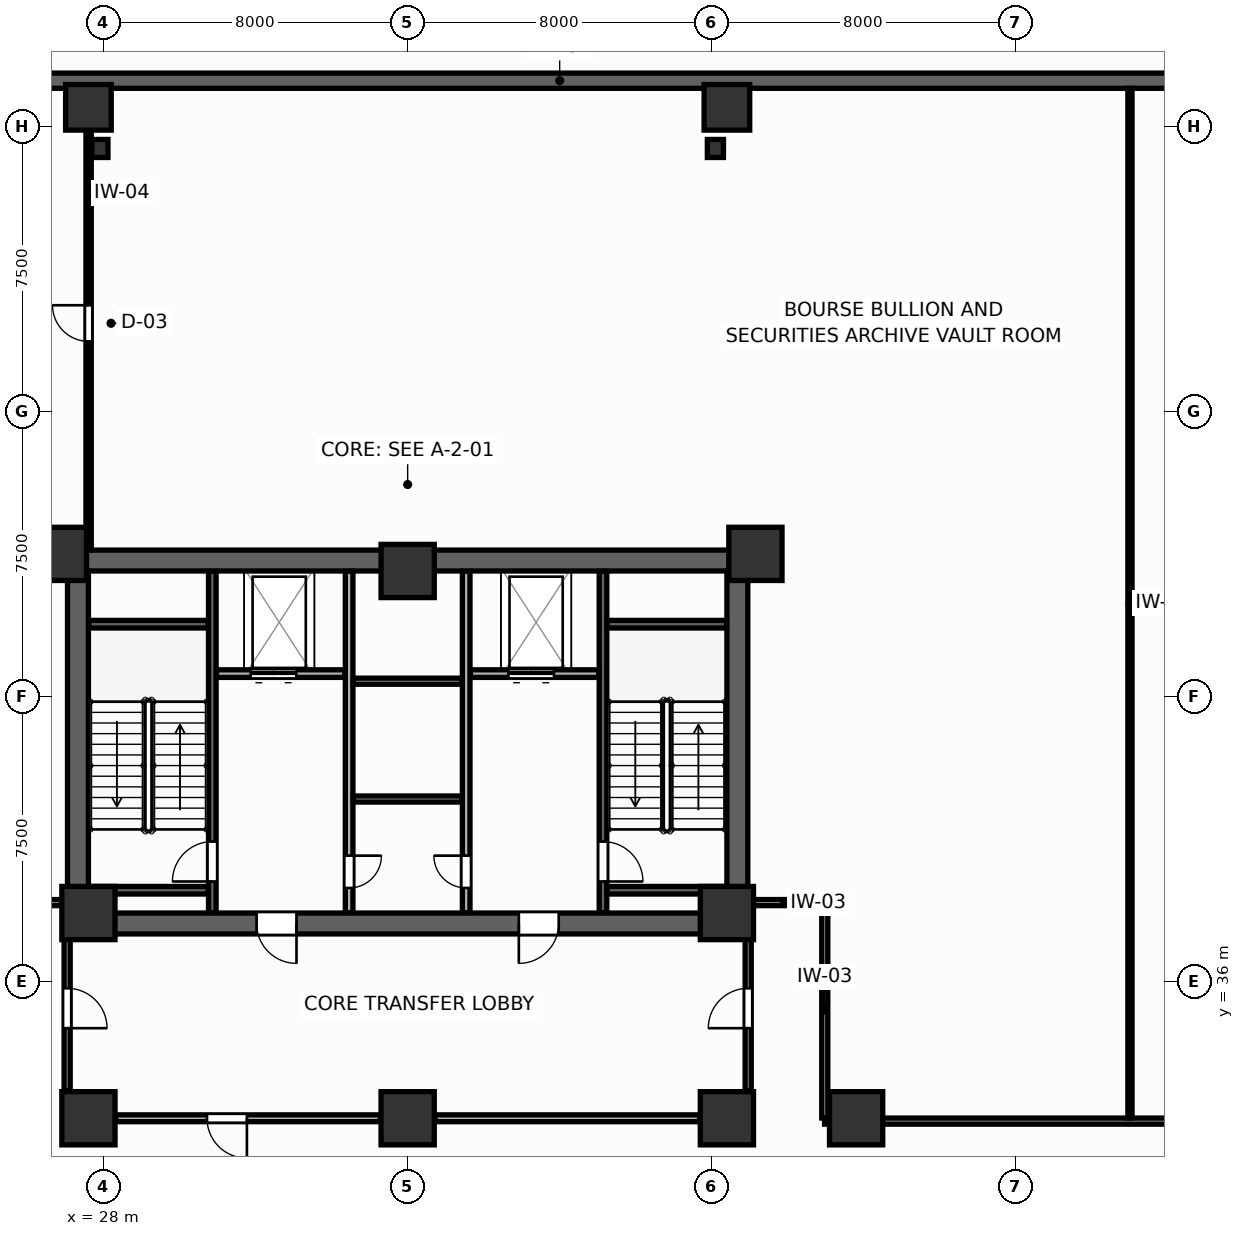
"""IFC4 building model, lengths in metres.
Left out: names, types, materials, properties, quantities, classifications, styles, units other than length and angle.
Written with IfcOpenShell. Run it as: python <this file> out.ifc"""

import sys

from ifc_helpers import new_model, si_unit, direction, frame, frame_2d, origin, origin_2d, place, context, subcontext, project, spatial, rectangle, i_section, extrude, source, transform, mapped, element, fill, save


model = new_model("IFC4")
c1 = context("Model", 3, precision=1e-05, world=origin(), true_north=direction((0.0, 1.0)))
c2 = subcontext(c1, "Body", "Model", "MODEL_VIEW")
j1 = project(units=[si_unit("LENGTHUNIT", "METRE"), si_unit("PLANEANGLEUNIT", "RADIAN")], contexts=[c1])
p1 = place(None, origin())
s1 = spatial("IfcSite", under=j1, at=p1, CompositionType="ELEMENT")
p2 = place(p1, origin())
s2 = spatial("IfcBuilding", under=s1, at=p2, CompositionType="ELEMENT")
p3 = place(p2, frame((0.0, 0.0, -9.0)))
s3 = spatial("IfcBuildingStorey", under=s2, at=p3, CompositionType="ELEMENT", Elevation=-9.0)
p4 = place(p3, frame((27.05, 47.075, 0.0), z_axis=(0.0, 0.0, 1.0), x_axis=(1.0, 0.0, 0.0)))
e1 = element("IfcWall", 1, at=p4, inside=s3, PredefinedType="SHEAR", context=c2, shape_type="SweptSolid", body=[
    extrude(rectangle(XDim=17.9, YDim=0.55, at=frame_2d((8.95, 0.0))), origin(), (0.0, 0.0, 1.0), 4.5),
])
p5 = place(p3, frame((27.05, 37.525, 0.0), z_axis=(0.0, 0.0, 1.0), x_axis=(1.0, 0.0, 0.0)))
e2 = element("IfcWall", 2, at=p5, inside=s3, PredefinedType="SHEAR", context=c2, shape_type="SweptSolid", body=[
    extrude(rectangle(XDim=17.9, YDim=0.55, at=frame_2d((8.95, 0.0))), origin(), (0.0, 0.0, 1.0), 4.5),
])
p6 = place(p5, frame((4.975, 0.0, 0.0)))
e3 = element("IfcOpeningElement", 3, at=p6, cuts=e2, PredefinedType="OPENING", context=c2, shape_type="SweptSolid", body=[
    extrude(rectangle(XDim=1.05, YDim=2.1, at=frame_2d((0.525, 1.05))), frame((0.0, 0.285, 0.0), z_axis=(0.0, -1.0, 0.0), x_axis=(1.0, 0.0, 0.0)), (0.0, 0.0, 1.0), 0.57),
])
p7 = place(p5, frame((11.875, 0.0, 0.0)))
e4 = element("IfcOpeningElement", 4, at=p7, cuts=e2, PredefinedType="OPENING", context=c2, shape_type="SweptSolid", body=[
    extrude(rectangle(XDim=1.05, YDim=2.1, at=frame_2d((0.525, 1.05))), frame((0.0, 0.285, 0.0), z_axis=(0.0, -1.0, 0.0), x_axis=(1.0, 0.0, 0.0)), (0.0, 0.0, 1.0), 0.57),
])
for number, where, z_axis, x_axis in (
    (5, (27.325, 37.8, 0.0), (0.0, 0.0, 1.0), (0.0, 1.0, 0.0)),
    (6, (44.675, 37.8, 0.0), (0.0, 0.0, 1.0), (0.0, 1.0, 0.0)),
):
    element("IfcWall", number, at=place(p3, frame(where, z_axis=z_axis, x_axis=x_axis)), inside=s3, PredefinedType="SHEAR", context=c2, shape_type="SweptSolid", body=[
        extrude(rectangle(XDim=9.0, YDim=0.55, at=frame_2d((4.5, 0.0))), origin(), (0.0, 0.0, 1.0), 4.5),
    ])
p8 = place(p3, frame((22.2, 59.7, 0.0), z_axis=(0.0, 0.0, 1.0), x_axis=(1.0, 0.0, 0.0)))
e7 = element("IfcWall", 7, at=p8, inside=s3, PredefinedType="SOLIDWALL", context=c2, shape_type="SweptSolid", body=[
    extrude(rectangle(XDim=35.6, YDim=0.4, at=frame_2d((17.8, 0.0))), origin(), (0.0, 0.0, 1.0), 4.18),
])
m1 = source(origin(), c2, "Body", "SweptSolid", [
    extrude(rectangle(XDim=1.4, YDim=1.4, at=origin_2d()), origin(), (0.0, 0.0, 1.0), 4.5),
])
for number, where, z_axis, x_axis in (
    (8, (26.85, 47.25, 0.0), (0.0, 0.0, 1.0), (1.0, 0.0, 0.0)),
    (9, (45.15, 47.25, 0.0), (0.0, 0.0, 1.0), (1.0, 0.0, 0.0)),
    (10, (27.6, 37.8, 0.0), (0.0, 0.0, 1.0), (1.0, 0.0, 0.0)),
    (11, (44.4, 37.8, 0.0), (0.0, 0.0, 1.0), (1.0, 0.0, 0.0)),
    (12, (27.6, 32.4, 0.0), (0.0, 0.0, 1.0), (1.0, 0.0, 0.0)),
    (13, (44.4, 32.4, 0.0), (0.0, 0.0, 1.0), (1.0, 0.0, 0.0)),
    (14, (36.0, 46.8, 0.0), (0.0, 0.0, 1.0), (1.0, 0.0, 0.0)),
    (15, (36.0, 32.4, 0.0), (0.0, 0.0, 1.0), (1.0, 0.0, 0.0)),
    (16, (47.8, 32.4, 0.0), (0.0, 0.0, 1.0), (1.0, 0.0, 0.0)),
):
    element("IfcColumn", number, at=place(p3, frame(where, z_axis=z_axis, x_axis=x_axis)), inside=s3, PredefinedType="COLUMN", context=c2, shape_type="MappedRepresentation", body=[
        mapped(m1, transform((0.0, 0.0, 0.0), scale=1.0)),
    ])
m2 = source(origin(), c2, "Body", "SweptSolid", [
    extrude(rectangle(XDim=1.2, YDim=1.2, at=origin_2d()), origin(), (0.0, 0.0, 1.0), 4.5),
])
for number, where, z_axis, x_axis in (
    (17, (27.6, 59.0, 0.0), (0.0, 0.0, 1.0), (1.0, 0.0, 0.0)),
    (18, (44.4, 59.0, 0.0), (0.0, 0.0, 1.0), (1.0, 0.0, 0.0)),
):
    element("IfcColumn", number, at=place(p3, frame(where, z_axis=z_axis, x_axis=x_axis)), inside=s3, PredefinedType="COLUMN", context=c2, shape_type="MappedRepresentation", body=[
        mapped(m2, transform((0.0, 0.0, 0.0), scale=1.0)),
    ])
m3 = source(origin(), c2, "Body", "SweptSolid", [
    extrude(i_section(OverallWidth=0.424, OverallDepth=0.474, WebThickness=0.045, FlangeThickness=0.072, FilletRadius=0.015, at=origin_2d()), origin(), (0.0, 0.0, 1.0), 4.5),
])
for number, where, z_axis, x_axis in (
    (19, (44.097, 57.917, 0.0), (0.0, 0.0, 1.0), (1.0, 0.0, 0.0)),
    (20, (27.903, 57.917, 0.0), (0.0, 0.0, 1.0), (1.0, 0.0, 0.0)),
):
    element("IfcColumn", number, at=place(p3, frame(where, z_axis=z_axis, x_axis=x_axis)), inside=s3, PredefinedType="COLUMN", context=c2, shape_type="MappedRepresentation", body=[
        mapped(m3, transform((0.0, 0.0, 0.0), scale=1.0)),
    ])
p9 = place(p3, frame((30.86, 37.81, 0.0), z_axis=(0.0, 0.0, 1.0), x_axis=(0.0, 1.0, 0.0)))
e21 = element("IfcWall", 21, at=p9, inside=s3, PredefinedType="SHEAR", context=c2, shape_type="SweptSolid", body=[
    extrude(rectangle(XDim=8.98, YDim=0.2, at=frame_2d((4.49, 0.0))), origin(), (0.0, 0.0, 1.0), 4.5),
])
p10 = place(p9, frame((0.82, 0.0, 0.0)))
e22 = element("IfcOpeningElement", 22, at=p10, cuts=e21, PredefinedType="OPENING", context=c2, shape_type="SweptSolid", body=[
    extrude(rectangle(XDim=1.05, YDim=2.1, at=frame_2d((0.525, 1.05))), frame((0.0, 0.11, 0.0), z_axis=(0.0, -1.0, 0.0), x_axis=(1.0, 0.0, 0.0)), (0.0, 0.0, 1.0), 0.22),
])
for number, where, z_axis, x_axis in (
    (23, (27.61, 45.4, 0.0), (0.0, 0.0, 1.0), (1.0, 0.0, 0.0)),
    (24, (27.61, 38.4, 0.0), (0.0, 0.0, 1.0), (1.0, 0.0, 0.0)),
):
    element("IfcWall", number, at=place(p3, frame(where, z_axis=z_axis, x_axis=x_axis)), inside=s3, PredefinedType="SHEAR", context=c2, shape_type="SweptSolid", body=[
        extrude(rectangle(XDim=3.14, YDim=0.2, at=frame_2d((1.57, 0.0))), origin(), (0.0, 0.0, 1.0), 4.5),
    ])
p11 = place(p3, frame((41.14, 37.81, 0.0), z_axis=(0.0, 0.0, 1.0), x_axis=(0.0, 1.0, 0.0)))
e25 = element("IfcWall", 25, at=p11, inside=s3, PredefinedType="SHEAR", context=c2, shape_type="SweptSolid", body=[
    extrude(rectangle(XDim=8.98, YDim=0.2, at=frame_2d((4.49, 0.0))), origin(), (0.0, 0.0, 1.0), 4.5),
])
p12 = place(p11, frame((0.82, 0.0, 0.0)))
e26 = element("IfcOpeningElement", 26, at=p12, cuts=e25, PredefinedType="OPENING", context=c2, shape_type="SweptSolid", body=[
    extrude(rectangle(XDim=1.05, YDim=2.1, at=frame_2d((0.525, 1.05))), frame((0.0, 0.11, 0.0), z_axis=(0.0, -1.0, 0.0), x_axis=(1.0, 0.0, 0.0)), (0.0, 0.0, 1.0), 0.22),
])
for number, where, z_axis, x_axis in (
    (27, (41.25, 45.4, 0.0), (0.0, 0.0, 1.0), (1.0, 0.0, 0.0)),
    (28, (41.25, 38.4, 0.0), (0.0, 0.0, 1.0), (1.0, 0.0, 0.0)),
):
    element("IfcWall", number, at=place(p3, frame(where, z_axis=z_axis, x_axis=x_axis)), inside=s3, PredefinedType="SHEAR", context=c2, shape_type="SweptSolid", body=[
        extrude(rectangle(XDim=3.14, YDim=0.2, at=frame_2d((1.57, 0.0))), origin(), (0.0, 0.0, 1.0), 4.5),
    ])
p13 = place(p3, frame((30.97, 44.1, 0.0), z_axis=(0.0, 0.0, 1.0), x_axis=(1.0, 0.0, 0.0)))
e29 = element("IfcWall", 29, at=p13, inside=s3, PredefinedType="PARTITIONING", context=c2, shape_type="SweptSolid", body=[
    extrude(rectangle(XDim=3.38, YDim=0.2, at=frame_2d((1.69, 0.0))), origin(), (0.0, 0.0, 1.0), 4.18),
])
p14 = place(p13, frame((0.9, 0.0, 0.0)))
e30 = element("IfcOpeningElement", 30, at=p14, cuts=e29, PredefinedType="OPENING", context=c2, shape_type="SweptSolid", body=[
    extrude(rectangle(XDim=1.2, YDim=2.1, at=frame_2d((0.6, 1.05))), frame((0.0, 0.11, 0.0), z_axis=(0.0, -1.0, 0.0), x_axis=(1.0, 0.0, 0.0)), (0.0, 0.0, 1.0), 0.22),
])
p15 = place(p3, frame((37.65, 44.1, 0.0), z_axis=(0.0, 0.0, 1.0), x_axis=(1.0, 0.0, 0.0)))
e31 = element("IfcWall", 31, at=p15, inside=s3, PredefinedType="PARTITIONING", context=c2, shape_type="SweptSolid", body=[
    extrude(rectangle(XDim=3.38, YDim=0.2, at=frame_2d((1.69, 0.0))), origin(), (0.0, 0.0, 1.0), 4.18),
])
p16 = place(p15, frame((1.0, 0.0, 0.0)))
e32 = element("IfcOpeningElement", 32, at=p16, cuts=e31, PredefinedType="OPENING", context=c2, shape_type="SweptSolid", body=[
    extrude(rectangle(XDim=1.2, YDim=2.1, at=frame_2d((0.6, 1.05))), frame((0.0, 0.11, 0.0), z_axis=(0.0, -1.0, 0.0), x_axis=(1.0, 0.0, 0.0)), (0.0, 0.0, 1.0), 0.22),
])
p17 = place(p3, frame((34.46, 37.81, 0.0), z_axis=(0.0, 0.0, 1.0), x_axis=(0.0, 1.0, 0.0)))
e33 = element("IfcWall", 33, at=p17, inside=s3, PredefinedType="PARTITIONING", context=c2, shape_type="SweptSolid", body=[
    extrude(rectangle(XDim=8.98, YDim=0.2, at=frame_2d((4.49, 0.0))), origin(), (0.0, 0.0, 1.0), 4.18),
])
p18 = place(p17, frame((0.65, 0.0, 0.0)))
e34 = element("IfcOpeningElement", 34, at=p18, cuts=e33, PredefinedType="OPENING", context=c2, shape_type="SweptSolid", body=[
    extrude(rectangle(XDim=0.85, YDim=2.05, at=frame_2d((0.425, 1.025))), frame((0.0, 0.11, 0.0), z_axis=(0.0, -1.0, 0.0), x_axis=(1.0, 0.0, 0.0)), (0.0, 0.0, 1.0), 0.22),
])
p19 = place(p3, frame((37.54, 37.81, 0.0), z_axis=(0.0, 0.0, 1.0), x_axis=(0.0, 1.0, 0.0)))
e35 = element("IfcWall", 35, at=p19, inside=s3, PredefinedType="PARTITIONING", context=c2, shape_type="SweptSolid", body=[
    extrude(rectangle(XDim=8.98, YDim=0.2, at=frame_2d((4.49, 0.0))), origin(), (0.0, 0.0, 1.0), 4.18),
])
p20 = place(p19, frame((0.65, 0.0, 0.0)))
e36 = element("IfcOpeningElement", 36, at=p20, cuts=e35, PredefinedType="OPENING", context=c2, shape_type="SweptSolid", body=[
    extrude(rectangle(XDim=0.85, YDim=2.05, at=frame_2d((0.425, 1.025))), frame((0.0, 0.11, 0.0), z_axis=(0.0, -1.0, 0.0), x_axis=(1.0, 0.0, 0.0)), (0.0, 0.0, 1.0), 0.22),
])
for number, where, z_axis, x_axis in (
    (37, (34.57, 40.8, 0.0), (0.0, 0.0, 1.0), (1.0, 0.0, 0.0)),
    (38, (34.57, 43.9, 0.0), (0.0, 0.0, 1.0), (1.0, 0.0, 0.0)),
):
    element("IfcWall", number, at=place(p3, frame(where, z_axis=z_axis, x_axis=x_axis)), inside=s3, PredefinedType="PARTITIONING", context=c2, shape_type="SweptSolid", body=[
        extrude(rectangle(XDim=2.86, YDim=0.16, at=frame_2d((1.43, 0.0))), origin(), (0.0, 0.0, 1.0), 4.18),
    ])
p21 = place(p3, frame((28.32, 32.4, 0.0), z_axis=(0.0, 0.0, 1.0), x_axis=(1.0, 0.0, 0.0)))
e39 = element("IfcWall", 39, at=p21, inside=s3, PredefinedType="PARTITIONING", context=c2, shape_type="SweptSolid", body=[
    extrude(rectangle(XDim=6.96, YDim=0.18, at=frame_2d((3.48, 0.0))), origin(), (0.0, 0.0, 1.0), 3.48),
])
p22 = place(p21, frame((2.4, 0.0, 0.0)))
e40 = element("IfcOpeningElement", 40, at=p22, cuts=e39, PredefinedType="OPENING", context=c2, shape_type="SweptSolid", body=[
    extrude(rectangle(XDim=1.05, YDim=2.1, at=frame_2d((0.525, 1.05))), frame((0.0, 0.1, 0.0), z_axis=(0.0, -1.0, 0.0), x_axis=(1.0, 0.0, 0.0)), (0.0, 0.0, 1.0), 0.2),
])
p23 = place(p3, frame((36.72, 32.4, 0.0), z_axis=(0.0, 0.0, 1.0), x_axis=(1.0, 0.0, 0.0)))
e41 = element("IfcWall", 41, at=p23, inside=s3, PredefinedType="PARTITIONING", context=c2, shape_type="SweptSolid", body=[
    extrude(rectangle(XDim=6.96, YDim=0.18, at=frame_2d((3.48, 0.0))), origin(), (0.0, 0.0, 1.0), 3.48),
])
p24 = place(p3, frame((27.04, 33.12, 0.0), z_axis=(0.0, 0.0, 1.0), x_axis=(0.0, 1.0, 0.0)))
e42 = element("IfcWall", 42, at=p24, inside=s3, PredefinedType="PARTITIONING", context=c2, shape_type="SweptSolid", body=[
    extrude(rectangle(XDim=4.38, YDim=0.16, at=frame_2d((2.19, 0.0))), origin(), (0.0, 0.0, 1.0), 4.18),
])
p25 = place(p24, frame((1.65, 0.0, 0.0)))
e43 = element("IfcOpeningElement", 43, at=p25, cuts=e42, PredefinedType="OPENING", context=c2, shape_type="SweptSolid", body=[
    extrude(rectangle(XDim=1.05, YDim=2.1, at=frame_2d((0.525, 1.05))), frame((0.0, 0.09, 0.0), z_axis=(0.0, -1.0, 0.0), x_axis=(1.0, 0.0, 0.0)), (0.0, 0.0, 1.0), 0.18),
])
p26 = place(p3, frame((44.96, 33.12, 0.0), z_axis=(0.0, 0.0, 1.0), x_axis=(0.0, 1.0, 0.0)))
e44 = element("IfcWall", 44, at=p26, inside=s3, PredefinedType="PARTITIONING", context=c2, shape_type="SweptSolid", body=[
    extrude(rectangle(XDim=4.38, YDim=0.16, at=frame_2d((2.19, 0.0))), origin(), (0.0, 0.0, 1.0), 4.18),
])
p27 = place(p26, frame((1.65, 0.0, 0.0)))
e45 = element("IfcOpeningElement", 45, at=p27, cuts=e44, PredefinedType="OPENING", context=c2, shape_type="SweptSolid", body=[
    extrude(rectangle(XDim=1.05, YDim=2.1, at=frame_2d((0.525, 1.05))), frame((0.0, 0.09, 0.0), z_axis=(0.0, -1.0, 0.0), x_axis=(1.0, 0.0, 0.0)), (0.0, 0.0, 1.0), 0.18),
])
p28 = place(p3, frame((46.97, 32.325, 0.0), z_axis=(0.0, 0.0, 1.0), x_axis=(1.0, 0.0, 0.0)))
e46 = element("IfcWall", 46, at=p28, inside=s3, PredefinedType="PARTITIONING", context=c2, shape_type="SweptSolid", body=[
    extrude(rectangle(XDim=41.608, YDim=0.16, at=frame_2d((20.804, 0.0))), origin(), (0.0, 0.0, 1.0), 3.48),
])
p29 = place(p28, frame((24.18, 0.0, 0.0)))
e47 = element("IfcOpeningElement", 47, at=p29, cuts=e46, PredefinedType="OPENING", context=c2, shape_type="SweptSolid", body=[
    extrude(rectangle(XDim=0.95, YDim=2.05, at=frame_2d((0.475, 1.025))), frame((0.0, 0.09, 0.0), z_axis=(0.0, -1.0, 0.0), x_axis=(1.0, 0.0, 0.0)), (0.0, 0.0, 1.0), 0.18),
])
p30 = place(p3, frame((46.975, 32.407, 0.0), z_axis=(0.0, 0.0, 1.0), x_axis=(0.0, 1.0, 0.0)))
e48 = element("IfcWall", 48, at=p30, inside=s3, PredefinedType="PARTITIONING", context=c2, shape_type="SweptSolid", body=[
    extrude(rectangle(XDim=5.673, YDim=0.16, at=frame_2d((2.836, 0.0))), origin(), (0.0, 0.0, 1.0), 4.18),
])
for number, where, z_axis, x_axis in (
    (49, (25.107, 38.075, 0.0), (0.0, 0.0, 1.0), (1.0, 0.0, 0.0)),
    (50, (44.952, 38.075, 0.0), (0.0, 0.0, 1.0), (1.0, 0.0, 0.0)),
):
    element("IfcWall", number, at=place(p3, frame(where, z_axis=z_axis, x_axis=x_axis)), inside=s3, PredefinedType="PARTITIONING", context=c2, shape_type="SweptSolid", body=[
        extrude(rectangle(XDim=1.941, YDim=0.16, at=frame_2d((0.971, 0.0))), origin(), (0.0, 0.0, 1.0), 4.18),
    ])
p31 = place(p3, frame((55.005, 32.407, 0.0), z_axis=(0.0, 0.0, 1.0), x_axis=(0.0, 1.0, 0.0)))
e51 = element("IfcWall", 51, at=p31, inside=s3, PredefinedType="MOVABLE", context=c2, shape_type="SweptSolid", body=[
    extrude(rectangle(XDim=27.091, YDim=0.11, at=frame_2d((13.545, 0.0))), origin(), (0.0, 0.0, 1.0), 4.18),
])
p32 = place(p3, frame((27.605, 47.352, 0.0), z_axis=(0.0, 0.0, 1.0), x_axis=(0.0, 1.0, 0.0)))
e52 = element("IfcWall", 52, at=p32, inside=s3, PredefinedType="PARTITIONING", context=c2, shape_type="SweptSolid", body=[
    extrude(rectangle(XDim=12.146, YDim=0.14, at=frame_2d((6.073, 0.0))), origin(), (0.0, 0.0, 1.0), 4.18),
])
p33 = place(p32, frame((5.49, 0.0, 0.0)))
e53 = element("IfcOpeningElement", 53, at=p33, cuts=e52, PredefinedType="OPENING", context=c2, shape_type="SweptSolid", body=[
    extrude(rectangle(XDim=0.95, YDim=2.05, at=frame_2d((0.475, 1.025))), frame((0.0, 0.08, 0.0), z_axis=(0.0, -1.0, 0.0), x_axis=(1.0, 0.0, 0.0)), (0.0, 0.0, 1.0), 0.16),
])
p34 = place(p10, origin())
e54 = element("IfcDoor", 54, at=p34, inside=s3, OperationType="SINGLE_SWING_LEFT", PredefinedType="DOOR", context=c2, shape_type="SweptSolid", body=[
    extrude(rectangle(XDim=1.05, YDim=2.1, at=frame_2d((0.525, 1.05))), frame((0.0, 0.025, 0.0), z_axis=(0.0, -1.0, 0.0), x_axis=(1.0, 0.0, 0.0)), (0.0, 0.0, 1.0), 0.05),
])
fill(e22, e54)
p35 = place(p12, frame((1.05, 0.0, 0.0), z_axis=(0.0, 0.0, 1.0), x_axis=(-1.0, 0.0, 0.0)))
e55 = element("IfcDoor", 55, at=p35, inside=s3, OperationType="SINGLE_SWING_RIGHT", PredefinedType="DOOR", context=c2, shape_type="SweptSolid", body=[
    extrude(rectangle(XDim=1.05, YDim=2.1, at=frame_2d((0.525, 1.05))), frame((0.0, 0.025, 0.0), z_axis=(0.0, -1.0, 0.0), x_axis=(1.0, 0.0, 0.0)), (0.0, 0.0, 1.0), 0.05),
])
fill(e26, e55)
p36 = place(p14, origin())
e56 = element("IfcDoor", 56, at=p36, inside=s3, OperationType="DOUBLE_DOOR_SLIDING", PredefinedType="DOOR", context=c2, shape_type="SweptSolid", body=[
    extrude(rectangle(XDim=1.2, YDim=2.1, at=frame_2d((0.6, 1.05))), frame((0.0, 0.025, 0.0), z_axis=(0.0, -1.0, 0.0), x_axis=(1.0, 0.0, 0.0)), (0.0, 0.0, 1.0), 0.05),
])
fill(e30, e56)
p37 = place(p16, origin())
e57 = element("IfcDoor", 57, at=p37, inside=s3, OperationType="DOUBLE_DOOR_SLIDING", PredefinedType="DOOR", context=c2, shape_type="SweptSolid", body=[
    extrude(rectangle(XDim=1.2, YDim=2.1, at=frame_2d((0.6, 1.05))), frame((0.0, 0.025, 0.0), z_axis=(0.0, -1.0, 0.0), x_axis=(1.0, 0.0, 0.0)), (0.0, 0.0, 1.0), 0.05),
])
fill(e32, e57)
p38 = place(p18, frame((0.85, 0.0, 0.0), z_axis=(0.0, 0.0, 1.0), x_axis=(-1.0, 0.0, 0.0)))
e58 = element("IfcDoor", 58, at=p38, inside=s3, OperationType="SINGLE_SWING_LEFT", PredefinedType="DOOR", context=c2, shape_type="SweptSolid", body=[
    extrude(rectangle(XDim=0.85, YDim=2.05, at=frame_2d((0.425, 1.025))), frame((0.0, 0.025, 0.0), z_axis=(0.0, -1.0, 0.0), x_axis=(1.0, 0.0, 0.0)), (0.0, 0.0, 1.0), 0.05),
])
fill(e34, e58)
p39 = place(p20, origin())
e59 = element("IfcDoor", 59, at=p39, inside=s3, OperationType="SINGLE_SWING_RIGHT", PredefinedType="DOOR", context=c2, shape_type="SweptSolid", body=[
    extrude(rectangle(XDim=0.85, YDim=2.05, at=frame_2d((0.425, 1.025))), frame((0.0, 0.025, 0.0), z_axis=(0.0, -1.0, 0.0), x_axis=(1.0, 0.0, 0.0)), (0.0, 0.0, 1.0), 0.05),
])
fill(e36, e59)
p40 = place(p22, frame((1.05, 0.0, 0.0), z_axis=(0.0, 0.0, 1.0), x_axis=(-1.0, 0.0, 0.0)))
e60 = element("IfcDoor", 60, at=p40, inside=s3, OperationType="SINGLE_SWING_LEFT", PredefinedType="DOOR", context=c2, shape_type="SweptSolid", body=[
    extrude(rectangle(XDim=1.05, YDim=2.1, at=frame_2d((0.525, 1.05))), frame((0.0, 0.025, 0.0), z_axis=(0.0, -1.0, 0.0), x_axis=(1.0, 0.0, 0.0)), (0.0, 0.0, 1.0), 0.05),
])
fill(e40, e60)
p41 = place(p25, frame((1.05, 0.0, 0.0), z_axis=(0.0, 0.0, 1.0), x_axis=(-1.0, 0.0, 0.0)))
e61 = element("IfcDoor", 61, at=p41, inside=s3, OperationType="SINGLE_SWING_RIGHT", PredefinedType="DOOR", context=c2, shape_type="SweptSolid", body=[
    extrude(rectangle(XDim=1.05, YDim=2.1, at=frame_2d((0.525, 1.05))), frame((0.0, 0.025, 0.0), z_axis=(0.0, -1.0, 0.0), x_axis=(1.0, 0.0, 0.0)), (0.0, 0.0, 1.0), 0.05),
])
fill(e43, e61)
p42 = place(p27, origin())
e62 = element("IfcDoor", 62, at=p42, inside=s3, OperationType="SINGLE_SWING_LEFT", PredefinedType="DOOR", context=c2, shape_type="SweptSolid", body=[
    extrude(rectangle(XDim=1.05, YDim=2.1, at=frame_2d((0.525, 1.05))), frame((0.0, 0.025, 0.0), z_axis=(0.0, -1.0, 0.0), x_axis=(1.0, 0.0, 0.0)), (0.0, 0.0, 1.0), 0.05),
])
fill(e45, e62)
p43 = place(p33, origin())
e63 = element("IfcDoor", 63, at=p43, inside=s3, OperationType="SINGLE_SWING_RIGHT", PredefinedType="DOOR", context=c2, shape_type="SweptSolid", body=[
    extrude(rectangle(XDim=0.95, YDim=2.05, at=frame_2d((0.475, 1.025))), frame((0.0, 0.025, 0.0), z_axis=(0.0, -1.0, 0.0), x_axis=(1.0, 0.0, 0.0)), (0.0, 0.0, 1.0), 0.05),
])
fill(e53, e63)
p44 = place(p6, frame((1.05, 0.0, 0.0), z_axis=(0.0, 0.0, 1.0), x_axis=(-1.0, 0.0, 0.0)))
e64 = element("IfcDoor", 64, at=p44, inside=s3, OperationType="SINGLE_SWING_LEFT", PredefinedType="DOOR", context=c2, shape_type="SweptSolid", body=[
    extrude(rectangle(XDim=1.05, YDim=2.1, at=frame_2d((0.525, 1.05))), frame((0.0, 0.025, 0.0), z_axis=(0.0, -1.0, 0.0), x_axis=(1.0, 0.0, 0.0)), (0.0, 0.0, 1.0), 0.05),
])
fill(e3, e64)
p45 = place(p7, frame((1.05, 0.0, 0.0), z_axis=(0.0, 0.0, 1.0), x_axis=(-1.0, 0.0, 0.0)))
e65 = element("IfcDoor", 65, at=p45, inside=s3, OperationType="SINGLE_SWING_RIGHT", PredefinedType="DOOR", context=c2, shape_type="SweptSolid", body=[
    extrude(rectangle(XDim=1.05, YDim=2.1, at=frame_2d((0.525, 1.05))), frame((0.0, 0.025, 0.0), z_axis=(0.0, -1.0, 0.0), x_axis=(1.0, 0.0, 0.0)), (0.0, 0.0, 1.0), 0.05),
])
fill(e4, e65)
save(model, sys.argv[1])
